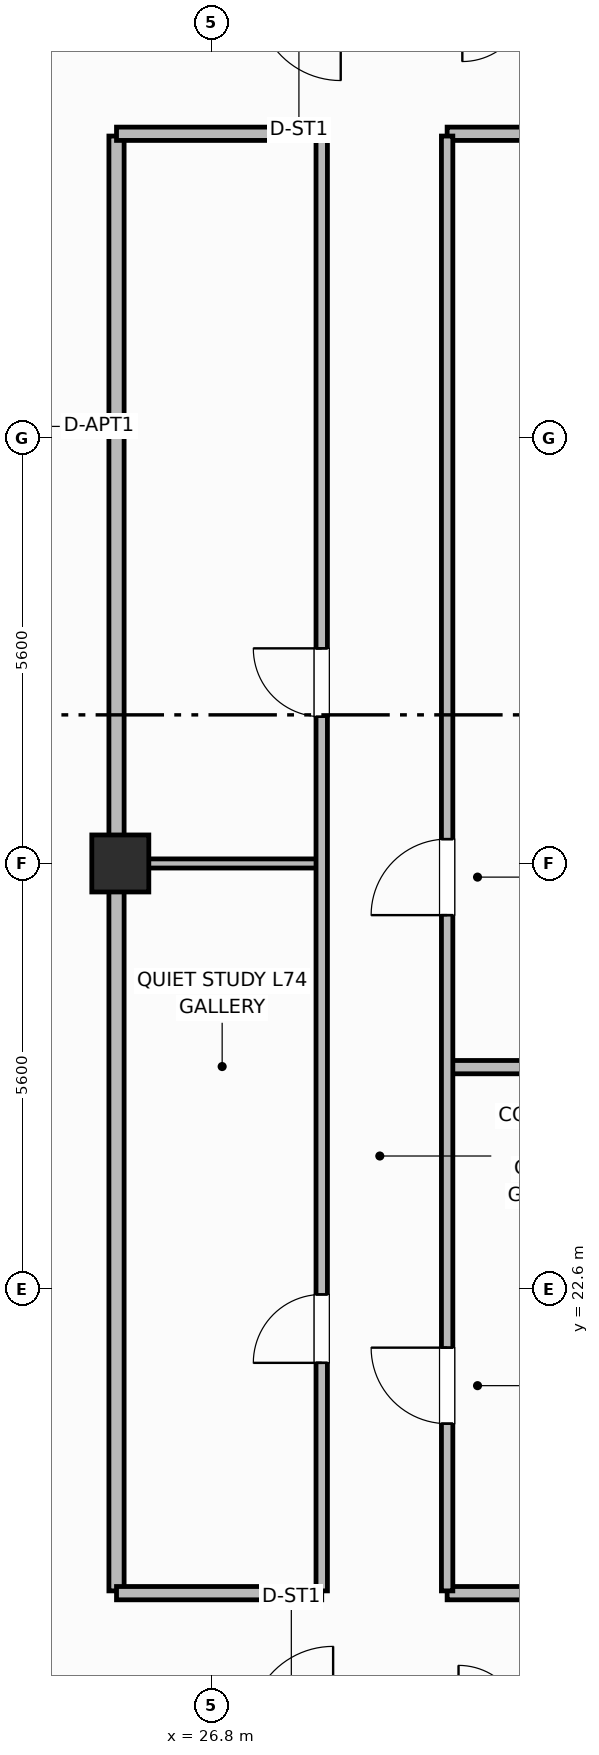
"""IFC4 building model, lengths in metres.
Left out: names, types, materials, properties, quantities, classifications, styles, units other than length and angle.
Written with IfcOpenShell. Run it as: python <this file> out.ifc"""

import sys

from ifc_helpers import new_model, si_unit, direction, frame, frame_2d, origin, origin_2d, place, context, subcontext, project, spatial, rectangle, extrude, element, fill, save


model = new_model("IFC4")
c1 = context("Model", 3, precision=1e-05, world=origin(), true_north=direction((0.0, 1.0)))
c2 = subcontext(c1, "Body", "Model", "MODEL_VIEW")
j1 = project(units=[si_unit("LENGTHUNIT", "METRE"), si_unit("PLANEANGLEUNIT", "RADIAN")], contexts=[c1])
p1 = place(None, origin())
s1 = spatial("IfcSite", under=j1, at=p1, CompositionType="ELEMENT")
p2 = place(p1, origin())
s2 = spatial("IfcBuilding", under=s1, at=p2, CompositionType="ELEMENT")
p3 = place(p2, frame((0.0, 0.0, 293.5)))
s3 = spatial("IfcBuildingStorey", under=s2, at=p3, CompositionType="ELEMENT", Elevation=293.5)
p4 = place(p3, frame((25.6, 28.2, 0.0), z_axis=(0.0, 0.0, 1.0), x_axis=(1.0, 0.0, 0.0)))
e1 = element("IfcColumn", 1, at=p4, inside=s3, PredefinedType="COLUMN", context=c2, shape_type="SweptSolid", body=[
    extrude(rectangle(XDim=0.75, YDim=0.75, at=origin_2d()), origin(), (0.0, 0.0, 1.0), 3.7),
])
p5 = place(p3, frame((25.55, 18.63, 0.0), z_axis=(0.0, 0.0, 1.0), x_axis=(0.0, 1.0, 0.0)))
e2 = element("IfcWall", 2, at=p5, inside=s3, PredefinedType="PARTITIONING", context=c2, shape_type="SweptSolid", body=[
    extrude(rectangle(XDim=19.14, YDim=0.2, at=frame_2d((9.57, 0.0))), origin(), (0.0, 0.0, 1.0), 2.54),
])
p6 = place(p3, frame((25.55, 18.6, 0.0), z_axis=(0.0, 0.0, 1.0), x_axis=(1.0, 0.0, 0.0)))
e3 = element("IfcWall", 3, at=p6, inside=s3, PredefinedType="PARTITIONING", context=c2, shape_type="SweptSolid", body=[
    extrude(rectangle(XDim=2.7, YDim=0.175, at=frame_2d((1.35, 0.0))), origin(), (0.0, 0.0, 1.0), 2.54),
])
p7 = place(p3, frame((29.9, 18.6, 0.0), z_axis=(0.0, 0.0, 1.0), x_axis=(1.0, 0.0, 0.0)))
e4 = element("IfcWall", 4, at=p7, inside=s3, PredefinedType="PARTITIONING", context=c2, shape_type="SweptSolid", body=[
    extrude(rectangle(XDim=22.95, YDim=0.175, at=frame_2d((11.475, 0.0))), origin(), (0.0, 0.0, 1.0), 2.54),
])
p8 = place(p3, frame((25.55, 37.8, 0.0), z_axis=(0.0, 0.0, 1.0), x_axis=(1.0, 0.0, 0.0)))
e5 = element("IfcWall", 5, at=p8, inside=s3, PredefinedType="PARTITIONING", context=c2, shape_type="SweptSolid", body=[
    extrude(rectangle(XDim=2.7, YDim=0.175, at=frame_2d((1.35, 0.0))), origin(), (0.0, 0.0, 1.0), 2.54),
])
p9 = place(p3, frame((29.9, 37.8, 0.0), z_axis=(0.0, 0.0, 1.0), x_axis=(1.0, 0.0, 0.0)))
e6 = element("IfcWall", 6, at=p9, inside=s3, PredefinedType="PARTITIONING", context=c2, shape_type="SweptSolid", body=[
    extrude(rectangle(XDim=22.95, YDim=0.175, at=frame_2d((11.475, 0.0))), origin(), (0.0, 0.0, 1.0), 2.54),
])
p10 = place(p3, frame((25.6, 28.2, 0.0), z_axis=(0.0, 0.0, 1.0), x_axis=(1.0, 0.0, 0.0)))
e7 = element("IfcWall", 7, at=p10, inside=s3, PredefinedType="PARTITIONING", context=c2, shape_type="SweptSolid", body=[
    extrude(rectangle(XDim=2.66, YDim=0.12, at=frame_2d((1.33, 0.0))), origin(), (0.0, 0.0, 1.0), 2.54),
])
p11 = place(p3, frame((29.93, 25.521, 0.0), z_axis=(0.0, 0.0, 1.0), x_axis=(1.0, 0.0, 0.0)))
e8 = element("IfcWall", 8, at=p11, inside=s3, PredefinedType="PARTITIONING", context=c2, shape_type="SweptSolid", body=[
    extrude(rectangle(XDim=22.87, YDim=0.175, at=frame_2d((11.435, 0.0))), origin(), (0.0, 0.0, 1.0), 2.54),
])
p12 = place(p3, frame((28.25, 18.63, 0.0), z_axis=(0.0, 0.0, 1.0), x_axis=(0.0, 1.0, 0.0)))
e9 = element("IfcWall", 9, at=p12, inside=s3, PredefinedType="PARTITIONING", context=c2, shape_type="SweptSolid", body=[
    extrude(rectangle(XDim=19.14, YDim=0.15, at=frame_2d((9.57, 0.0))), origin(), (0.0, 0.0, 1.0), 2.54),
])
p13 = place(p12, frame((3.0, 0.0, 0.0)))
e10 = element("IfcOpeningElement", 10, at=p13, cuts=e9, PredefinedType="OPENING", context=c2, shape_type="SweptSolid", body=[
    extrude(rectangle(XDim=0.9, YDim=2.1, at=frame_2d((0.45, 1.05))), frame((0.0, 0.085, 0.0), z_axis=(0.0, -1.0, 0.0), x_axis=(1.0, 0.0, 0.0)), (0.0, 0.0, 1.0), 0.17),
])
p14 = place(p12, frame((11.5, 0.0, 0.0)))
e11 = element("IfcOpeningElement", 11, at=p14, cuts=e9, PredefinedType="OPENING", context=c2, shape_type="SweptSolid", body=[
    extrude(rectangle(XDim=0.9, YDim=2.1, at=frame_2d((0.45, 1.05))), frame((0.0, 0.085, 0.0), z_axis=(0.0, -1.0, 0.0), x_axis=(1.0, 0.0, 0.0)), (0.0, 0.0, 1.0), 0.17),
])
p15 = place(p3, frame((29.9, 18.63, 0.0), z_axis=(0.0, 0.0, 1.0), x_axis=(0.0, 1.0, 0.0)))
e12 = element("IfcWall", 12, at=p15, inside=s3, PredefinedType="PARTITIONING", context=c2, shape_type="SweptSolid", body=[
    extrude(rectangle(XDim=19.14, YDim=0.15, at=frame_2d((9.57, 0.0))), origin(), (0.0, 0.0, 1.0), 2.54),
])
p16 = place(p15, frame((2.2, 0.0, 0.0)))
e13 = element("IfcOpeningElement", 13, at=p16, cuts=e12, PredefinedType="OPENING", context=c2, shape_type="SweptSolid", body=[
    extrude(rectangle(XDim=1.0, YDim=2.15, at=frame_2d((0.5, 1.075))), frame((0.0, 0.085, 0.0), z_axis=(0.0, -1.0, 0.0), x_axis=(1.0, 0.0, 0.0)), (0.0, 0.0, 1.0), 0.17),
])
p17 = place(p15, frame((8.89, 0.0, 0.0)))
e14 = element("IfcOpeningElement", 14, at=p17, cuts=e12, PredefinedType="OPENING", context=c2, shape_type="SweptSolid", body=[
    extrude(rectangle(XDim=1.0, YDim=2.15, at=frame_2d((0.5, 1.075))), frame((0.0, 0.085, 0.0), z_axis=(0.0, -1.0, 0.0), x_axis=(1.0, 0.0, 0.0)), (0.0, 0.0, 1.0), 0.17),
])
p18 = place(p13, origin())
e15 = element("IfcDoor", 15, at=p18, inside=s3, OperationType="SINGLE_SWING_LEFT", PredefinedType="DOOR", context=c2, shape_type="SweptSolid", body=[
    extrude(rectangle(XDim=0.9, YDim=2.1, at=frame_2d((0.45, 1.05))), frame((0.0, 0.025, 0.0), z_axis=(0.0, -1.0, 0.0), x_axis=(1.0, 0.0, 0.0)), (0.0, 0.0, 1.0), 0.05),
])
fill(e10, e15)
p19 = place(p14, origin())
e16 = element("IfcDoor", 16, at=p19, inside=s3, OperationType="SINGLE_SWING_RIGHT", PredefinedType="DOOR", context=c2, shape_type="SweptSolid", body=[
    extrude(rectangle(XDim=0.9, YDim=2.1, at=frame_2d((0.45, 1.05))), frame((0.0, 0.025, 0.0), z_axis=(0.0, -1.0, 0.0), x_axis=(1.0, 0.0, 0.0)), (0.0, 0.0, 1.0), 0.05),
])
fill(e11, e16)
p20 = place(p16, origin())
e17 = element("IfcDoor", 17, at=p20, inside=s3, OperationType="SINGLE_SWING_RIGHT", PredefinedType="DOOR", context=c2, shape_type="SweptSolid", body=[
    extrude(rectangle(XDim=1.0, YDim=2.15, at=frame_2d((0.5, 1.075))), frame((0.0, 0.025, 0.0), z_axis=(0.0, -1.0, 0.0), x_axis=(1.0, 0.0, 0.0)), (0.0, 0.0, 1.0), 0.05),
])
fill(e13, e17)
p21 = place(p17, origin())
e18 = element("IfcDoor", 18, at=p21, inside=s3, OperationType="SINGLE_SWING_LEFT", PredefinedType="DOOR", context=c2, shape_type="SweptSolid", body=[
    extrude(rectangle(XDim=1.0, YDim=2.15, at=frame_2d((0.5, 1.075))), frame((0.0, 0.025, 0.0), z_axis=(0.0, -1.0, 0.0), x_axis=(1.0, 0.0, 0.0)), (0.0, 0.0, 1.0), 0.05),
])
fill(e14, e18)
save(model, sys.argv[1])
